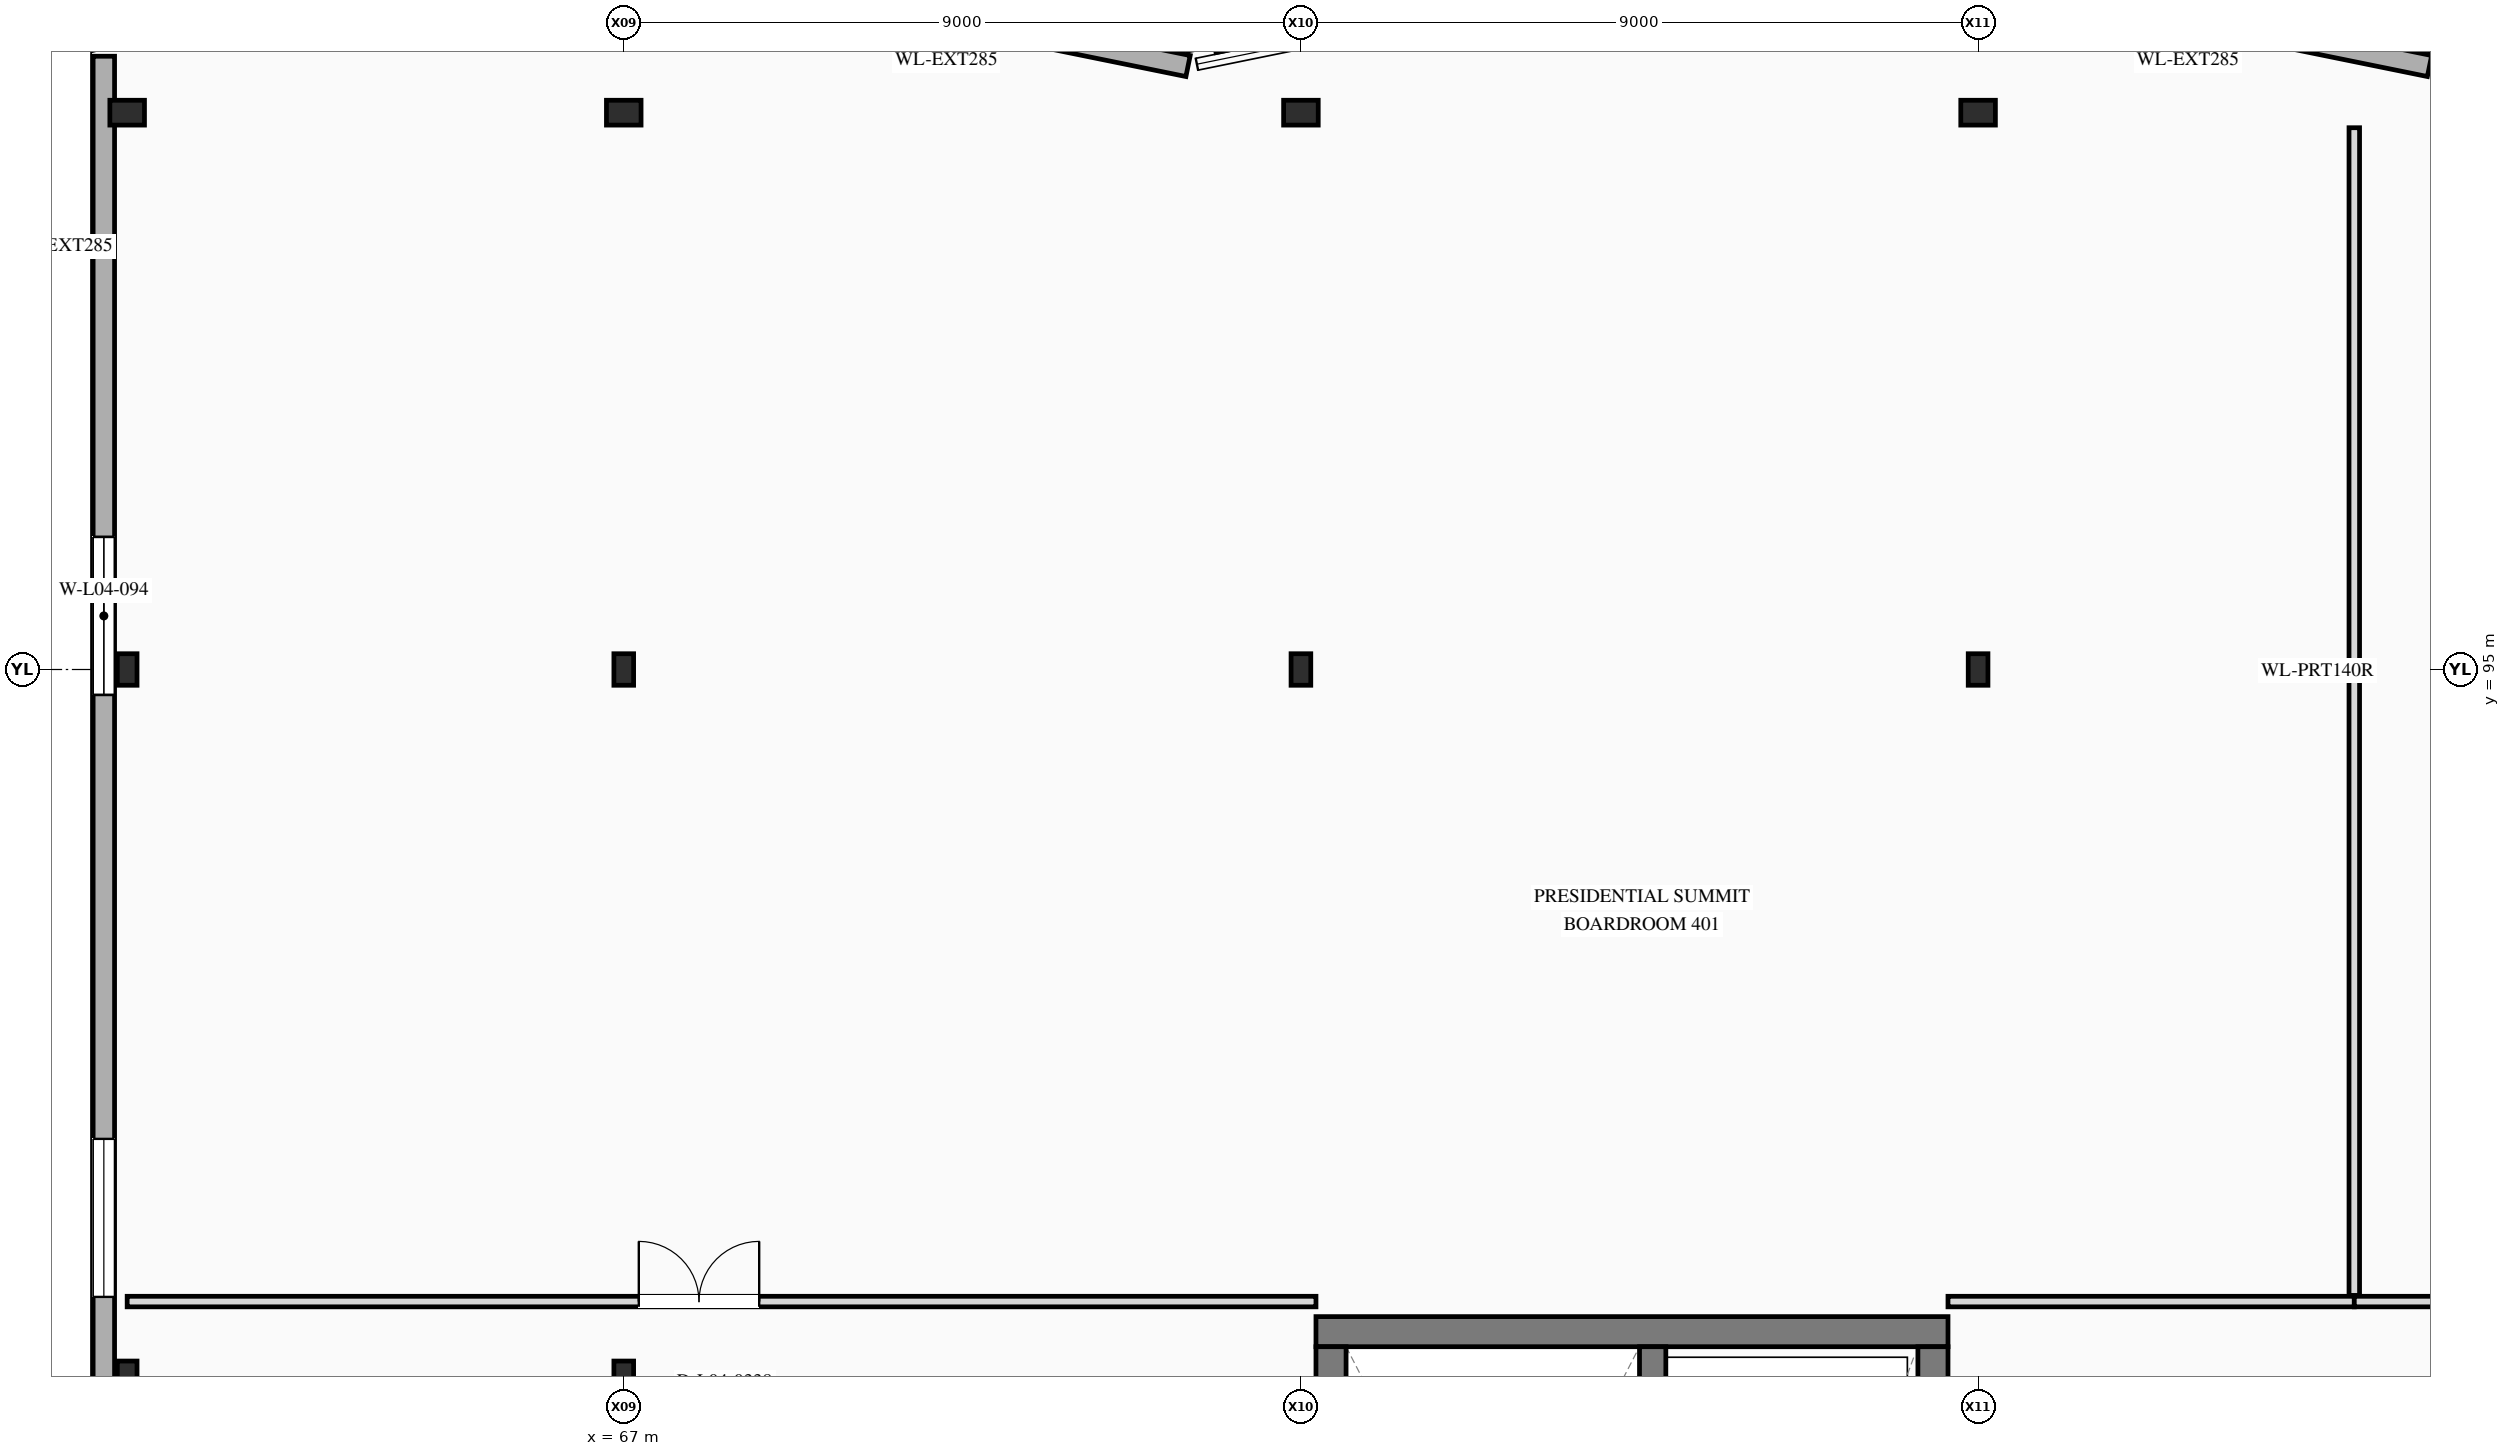
"""IFC4 building model, lengths in metres.
Left out: names, types, materials, properties, quantities, classifications, styles, units other than length and angle.
Written with IfcOpenShell. Run it as: python <this file> out.ifc"""

import sys

from ifc_helpers import new_model, si_unit, direction, frame, frame_2d, origin, origin_2d, place, context, subcontext, project, spatial, rectangle, i_section, extrude, element, fill, save


model = new_model("IFC4")
c1 = context("Model", 3, precision=1e-05, world=origin(), true_north=direction((0.0, 1.0)))
c2 = subcontext(c1, "Body", "Model", "MODEL_VIEW")
j1 = project(units=[si_unit("LENGTHUNIT", "METRE"), si_unit("PLANEANGLEUNIT", "RADIAN")], contexts=[c1])
p1 = place(None, origin())
s1 = spatial("IfcSite", under=j1, at=p1, CompositionType="ELEMENT")
p2 = place(p1, origin())
s2 = spatial("IfcBuilding", under=s1, at=p2, CompositionType="ELEMENT")
p3 = place(p2, frame((0.0, 0.0, 19.5)))
s3 = spatial("IfcBuildingStorey", under=s2, at=p3, CompositionType="ELEMENT", Elevation=19.5)
for number, where, z_axis, x_axis in (
    (1, (67.0, 85.6, 0.0), (0.0, 0.0, 1.0), (1.0, 0.0, 0.0)),
    (2, (67.0, 95.0, 0.0), (0.0, 0.0, 1.0), (1.0, 0.0, 0.0)),
    (3, (76.0, 95.0, 0.0), (0.0, 0.0, 1.0), (1.0, 0.0, 0.0)),
    (4, (85.0, 95.0, 0.0), (0.0, 0.0, 1.0), (1.0, 0.0, 0.0)),
    (5, (60.4, 85.6, 0.0), (0.0, 0.0, 1.0), (1.0, 0.0, 0.0)),
    (6, (60.4, 95.0, 0.0), (0.0, 0.0, 1.0), (1.0, 0.0, 0.0)),
):
    element("IfcColumn", number, at=place(p3, frame(where, z_axis=z_axis, x_axis=x_axis)), inside=s3, PredefinedType="COLUMN", context=c2, shape_type="SweptSolid", body=[
        extrude(i_section(OverallWidth=0.262, OverallDepth=0.419, WebThickness=0.012, FlangeThickness=0.019, at=origin_2d()), origin(), (0.0, 0.0, 1.0), 3.9),
    ])
for number, where, z_axis, x_axis in (
    (7, (60.4, 102.4, 0.0), (0.0, 0.0, 1.0), (0.0, 1.0, 0.0)),
    (8, (67.0, 102.4, 0.0), (0.0, 0.0, 1.0), (0.0, 1.0, 0.0)),
    (9, (76.0, 102.4, 0.0), (0.0, 0.0, 1.0), (0.0, 1.0, 0.0)),
    (10, (85.0, 102.4, 0.0), (0.0, 0.0, 1.0), (0.0, 1.0, 0.0)),
):
    element("IfcColumn", number, at=place(p3, frame(where, z_axis=z_axis, x_axis=x_axis)), inside=s3, PredefinedType="COLUMN", context=c2, shape_type="SweptSolid", body=[
        extrude(i_section(OverallWidth=0.33, OverallDepth=0.46, WebThickness=0.016, FlangeThickness=0.026, at=origin_2d()), origin(), (0.0, 0.0, 1.0), 3.9),
    ])
p4 = place(p3, frame((66.25, 104.698, 0.0), z_axis=(0.0, 0.0, 1.0), x_axis=(0.979925045119, -0.199366260807, 0.0)))
e11 = element("IfcWall", 11, at=p4, inside=s3, PredefinedType="STANDARD", context=c2, shape_type="SweptSolid", body=[
    extrude(rectangle(XDim=8.419, YDim=0.285, at=frame_2d((4.209, 0.0))), origin(), (0.0, 0.0, 1.0), 3.9),
])
p5 = place(p4, frame((0.35, 0.0, 0.9)))
e12 = element("IfcOpeningElement", 12, at=p5, cuts=e11, PredefinedType="OPENING", context=c2, shape_type="SweptSolid", body=[
    extrude(rectangle(XDim=1.5, YDim=1.7, at=frame_2d((0.75, 0.85))), frame((0.0, 0.152, 0.0), z_axis=(0.0, -1.0, 0.0), x_axis=(1.0, 0.0, 0.0)), (0.0, 0.0, 1.0), 0.305),
])
p6 = place(p3, frame((82.75, 104.698, 0.0), z_axis=(0.0, 0.0, 1.0), x_axis=(0.979925045119, -0.199366260807, 0.0)))
e13 = element("IfcWall", 13, at=p6, inside=s3, PredefinedType="STANDARD", context=c2, shape_type="SweptSolid", body=[
    extrude(rectangle(XDim=8.419, YDim=0.285, at=frame_2d((4.209, 0.0))), origin(), (0.0, 0.0, 1.0), 3.9),
])
p7 = place(p6, frame((0.35, 0.0, 0.9)))
e14 = element("IfcOpeningElement", 14, at=p7, cuts=e13, PredefinedType="OPENING", context=c2, shape_type="SweptSolid", body=[
    extrude(rectangle(XDim=1.5, YDim=1.7, at=frame_2d((0.75, 0.85))), frame((0.0, 0.152, 0.0), z_axis=(0.0, -1.0, 0.0), x_axis=(1.0, 0.0, 0.0)), (0.0, 0.0, 1.0), 0.305),
])
p8 = place(p3, frame((60.09, 66.662, 0.0), z_axis=(0.0, 0.0, 1.0), x_axis=(0.0, 1.0, 0.0)))
e15 = element("IfcWall", 15, at=p8, inside=s3, PredefinedType="STANDARD", context=c2, shape_type="SweptSolid", body=[
    extrude(rectangle(XDim=36.488, YDim=0.285, at=frame_2d((18.244, 0.0))), origin(), (0.0, 0.0, 1.0), 3.9),
])
p9 = place(p8, frame((4.0, 0.0, 0.9)))
e16 = element("IfcOpeningElement", 16, at=p9, cuts=e15, PredefinedType="OPENING", context=c2, shape_type="SweptSolid", body=[
    extrude(rectangle(XDim=2.1, YDim=1.9, at=frame_2d((1.05, 0.95))), frame((0.0, 0.152, 0.0), z_axis=(0.0, -1.0, 0.0), x_axis=(1.0, 0.0, 0.0)), (0.0, 0.0, 1.0), 0.305),
])
p10 = place(p8, frame((12.0, 0.0, 0.9)))
e17 = element("IfcOpeningElement", 17, at=p10, cuts=e15, PredefinedType="OPENING", context=c2, shape_type="SweptSolid", body=[
    extrude(rectangle(XDim=2.1, YDim=1.9, at=frame_2d((1.05, 0.95))), frame((0.0, 0.152, 0.0), z_axis=(0.0, -1.0, 0.0), x_axis=(1.0, 0.0, 0.0)), (0.0, 0.0, 1.0), 0.305),
])
p11 = place(p8, frame((20.0, 0.0, 0.9)))
e18 = element("IfcOpeningElement", 18, at=p11, cuts=e15, PredefinedType="OPENING", context=c2, shape_type="SweptSolid", body=[
    extrude(rectangle(XDim=2.1, YDim=1.9, at=frame_2d((1.05, 0.95))), frame((0.0, 0.152, 0.0), z_axis=(0.0, -1.0, 0.0), x_axis=(1.0, 0.0, 0.0)), (0.0, 0.0, 1.0), 0.305),
])
p12 = place(p8, frame((28.0, 0.0, 0.9)))
e19 = element("IfcOpeningElement", 19, at=p12, cuts=e15, PredefinedType="OPENING", context=c2, shape_type="SweptSolid", body=[
    extrude(rectangle(XDim=2.1, YDim=1.9, at=frame_2d((1.05, 0.95))), frame((0.0, 0.152, 0.0), z_axis=(0.0, -1.0, 0.0), x_axis=(1.0, 0.0, 0.0)), (0.0, 0.0, 1.0), 0.305),
])
p13 = place(p3, frame((84.6, 86.2, 0.0), z_axis=(0.0, 0.0, 1.0), x_axis=(-1.0, 0.0, 0.0)))
e20 = element("IfcWall", 20, at=p13, inside=s3, PredefinedType="SHEAR", context=c2, shape_type="SweptSolid", body=[
    extrude(rectangle(XDim=8.4, YDim=0.4, at=frame_2d((4.2, 0.0))), origin(), (0.0, 0.0, 1.0), 3.9),
])
p14 = place(p3, frame((76.4, 86.0, 0.0), z_axis=(0.0, 0.0, 1.0), x_axis=(0.0, -1.0, 0.0)))
e21 = element("IfcWall", 21, at=p14, inside=s3, PredefinedType="SHEAR", context=c2, shape_type="SweptSolid", body=[
    extrude(rectangle(XDim=9.4, YDim=0.4, at=frame_2d((4.7, 0.0))), origin(), (0.0, 0.0, 1.0), 3.9),
])
p15 = place(p3, frame((84.4, 76.6, 0.0), z_axis=(0.0, 0.0, 1.0), x_axis=(0.0, 1.0, 0.0)))
e22 = element("IfcWall", 22, at=p15, inside=s3, PredefinedType="SHEAR", context=c2, shape_type="SweptSolid", body=[
    extrude(rectangle(XDim=9.4, YDim=0.4, at=frame_2d((4.7, 0.0))), origin(), (0.0, 0.0, 1.0), 3.9),
])
p16 = place(p15, frame((2.05, 0.0, 0.0)))
e23 = element("IfcOpeningElement", 23, at=p16, cuts=e22, PredefinedType="OPENING", context=c2, shape_type="SweptSolid", body=[
    extrude(rectangle(XDim=1.1, YDim=2.2, at=frame_2d((0.55, 1.1))), frame((0.0, 0.21, 0.0), z_axis=(0.0, -1.0, 0.0), x_axis=(1.0, 0.0, 0.0)), (0.0, 0.0, 1.0), 0.42),
])
p17 = place(p15, frame((5.65, 0.0, 0.0)))
e24 = element("IfcOpeningElement", 24, at=p17, cuts=e22, PredefinedType="OPENING", context=c2, shape_type="SweptSolid", body=[
    extrude(rectangle(XDim=1.1, YDim=2.2, at=frame_2d((0.55, 1.1))), frame((0.0, 0.21, 0.0), z_axis=(0.0, -1.0, 0.0), x_axis=(1.0, 0.0, 0.0)), (0.0, 0.0, 1.0), 0.42),
])
p18 = place(p3, frame((80.675, 76.6, 0.0), z_axis=(0.0, 0.0, 1.0), x_axis=(0.0, 1.0, 0.0)))
e25 = element("IfcWall", 25, at=p18, inside=s3, PredefinedType="SHEAR", context=c2, shape_type="SweptSolid", body=[
    extrude(rectangle(XDim=9.4, YDim=0.35, at=frame_2d((4.7, 0.0))), origin(), (0.0, 0.0, 1.0), 3.9),
])
p19 = place(p3, frame((60.4, 86.6, 0.0), z_axis=(0.0, 0.0, 1.0), x_axis=(1.0, 0.0, 0.0)))
e26 = element("IfcWall", 26, at=p19, inside=s3, PredefinedType="PARTITIONING", context=c2, shape_type="SweptSolid", body=[
    extrude(rectangle(XDim=15.8, YDim=0.14, at=frame_2d((7.9, 0.0))), origin(), (0.0, 0.0, 1.0), 3.059),
])
p20 = place(p19, frame((6.8, 0.0, 0.0)))
e27 = element("IfcOpeningElement", 27, at=p20, cuts=e26, PredefinedType="OPENING", context=c2, shape_type="SweptSolid", body=[
    extrude(rectangle(XDim=1.6, YDim=2.4, at=frame_2d((0.8, 1.2))), frame((0.0, 0.08, 0.0), z_axis=(0.0, -1.0, 0.0), x_axis=(1.0, 0.0, 0.0)), (0.0, 0.0, 1.0), 0.16),
])
p21 = place(p3, frame((84.6, 86.6, 0.0), z_axis=(0.0, 0.0, 1.0), x_axis=(1.0, 0.0, 0.0)))
e28 = element("IfcWall", 28, at=p21, inside=s3, PredefinedType="PARTITIONING", context=c2, shape_type="SweptSolid", body=[
    extrude(rectangle(XDim=5.4, YDim=0.14, at=frame_2d((2.7, 0.0))), origin(), (0.0, 0.0, 1.0), 3.585),
])
p22 = place(p3, frame((90.0, 86.6, 0.0), z_axis=(0.0, 0.0, 1.0), x_axis=(1.0, 0.0, 0.0)))
e29 = element("IfcWall", 29, at=p22, inside=s3, PredefinedType="PARTITIONING", context=c2, shape_type="SweptSolid", body=[
    extrude(rectangle(XDim=21.4, YDim=0.14, at=frame_2d((10.7, 0.0))), origin(), (0.0, 0.0, 1.0), 3.059),
])
p23 = place(p22, frame((9.2, 0.0, 0.0)))
e30 = element("IfcOpeningElement", 30, at=p23, cuts=e29, PredefinedType="OPENING", context=c2, shape_type="SweptSolid", body=[
    extrude(rectangle(XDim=1.6, YDim=2.4, at=frame_2d((0.8, 1.2))), frame((0.0, 0.08, 0.0), z_axis=(0.0, -1.0, 0.0), x_axis=(1.0, 0.0, 0.0)), (0.0, 0.0, 1.0), 0.16),
])
p24 = place(p3, frame((90.0, 86.682, 0.0), z_axis=(0.0, 0.0, 1.0), x_axis=(0.0, 1.0, 0.0)))
e31 = element("IfcWall", 31, at=p24, inside=s3, PredefinedType="PARTITIONING", context=c2, shape_type="SweptSolid", body=[
    extrude(rectangle(XDim=15.518, YDim=0.14, at=frame_2d((7.759, 0.0))), origin(), (0.0, 0.0, 1.0), 2.998),
])
p25 = place(p11, origin())
e32 = element("IfcWindow", 32, at=p25, inside=s3, PartitioningType="SINGLE_PANEL", PredefinedType="WINDOW", context=c2, shape_type="SweptSolid", body=[
    extrude(rectangle(XDim=2.1, YDim=1.9, at=frame_2d((1.05, 0.95))), frame((0.0, 0.03, 0.0), z_axis=(0.0, -1.0, 0.0), x_axis=(1.0, 0.0, 0.0)), (0.0, 0.0, 1.0), 0.06),
])
fill(e18, e32)
p26 = place(p12, origin())
e33 = element("IfcWindow", 33, at=p26, inside=s3, PartitioningType="SINGLE_PANEL", PredefinedType="WINDOW", context=c2, shape_type="SweptSolid", body=[
    extrude(rectangle(XDim=2.1, YDim=1.9, at=frame_2d((1.05, 0.95))), frame((0.0, 0.03, 0.0), z_axis=(0.0, -1.0, 0.0), x_axis=(1.0, 0.0, 0.0)), (0.0, 0.0, 1.0), 0.06),
])
fill(e19, e33)
p27 = place(p20, origin())
e34 = element("IfcDoor", 34, at=p27, inside=s3, OperationType="DOUBLE_DOOR_SINGLE_SWING", PredefinedType="DOOR", context=c2, shape_type="SweptSolid", body=[
    extrude(rectangle(XDim=1.6, YDim=2.4, at=frame_2d((0.8, 1.2))), frame((0.0, 0.025, 0.0), z_axis=(0.0, -1.0, 0.0), x_axis=(1.0, 0.0, 0.0)), (0.0, 0.0, 1.0), 0.05),
])
fill(e27, e34)
save(model, sys.argv[1])
